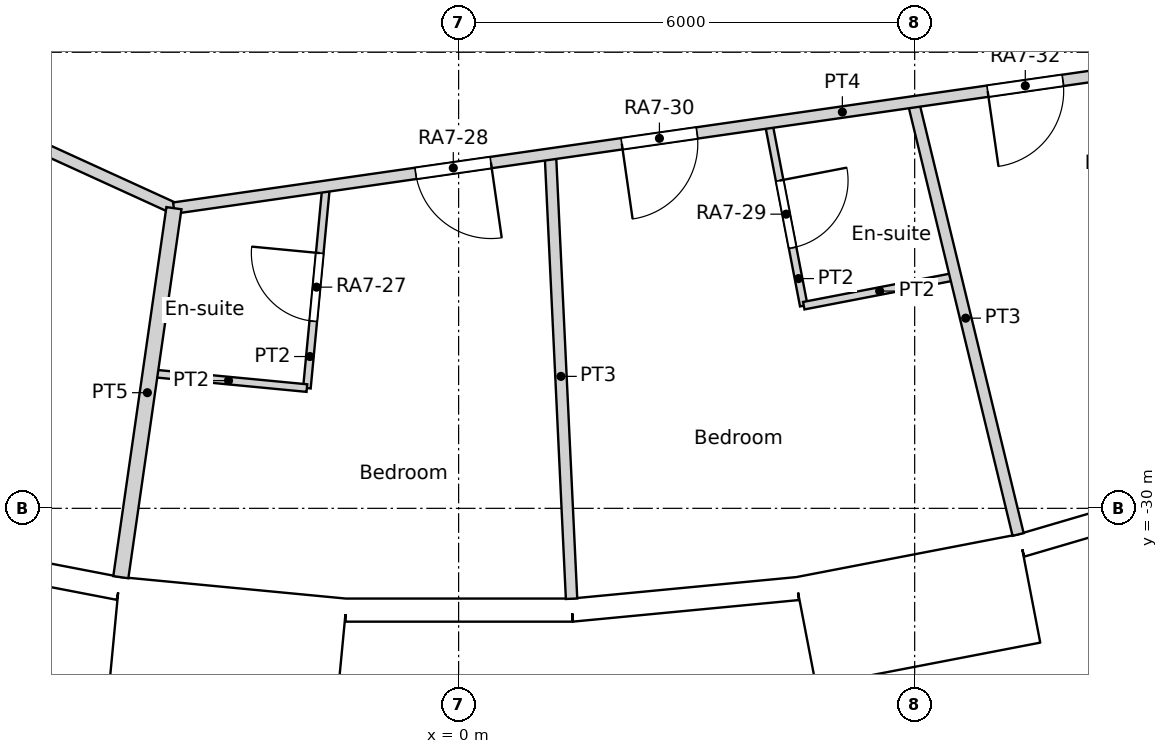
"""IFC4 building model, lengths in metres.
Left out: names, types, materials, properties, quantities, classifications, styles, units other than length and angle.
Written with IfcOpenShell. Run it as: python <this file> out.ifc"""

import sys

from ifc_helpers import new_model, si_unit, direction, frame, frame_2d, origin, origin_2d, place, context, subcontext, project, spatial, rectangle, circle, extrude, element, fill, save


model = new_model("IFC4")
c1 = context("Model", 3, precision=1e-05, world=origin(), true_north=direction((0.0, 1.0)))
c2 = subcontext(c1, "Body", "Model", "MODEL_VIEW")
j1 = project(units=[si_unit("LENGTHUNIT", "METRE"), si_unit("PLANEANGLEUNIT", "RADIAN")], contexts=[c1])
p1 = place(None, origin())
s1 = spatial("IfcSite", under=j1, at=p1, CompositionType="ELEMENT")
p2 = place(p1, origin())
s2 = spatial("IfcBuilding", under=s1, at=p2, CompositionType="ELEMENT")
p3 = place(p2, frame((0.0, 0.0, 93.0)))
s3 = spatial("IfcBuildingStorey", under=s2, at=p3, CompositionType="ELEMENT", Elevation=93.0)
for number, where, z_axis, x_axis in (
    (1, (-4.309, -29.966, 0.0), (0.0, 0.0, 1.0), (1.0, 0.0, 0.0)),
    (2, (1.44, -30.24, 0.0), (0.0, 0.0, 1.0), (1.0, 0.0, 0.0)),
    (3, (7.137, -29.421, 0.0), (0.0, 0.0, 1.0), (1.0, 0.0, 0.0)),
):
    element("IfcColumn", number, at=place(p3, frame(where, z_axis=z_axis, x_axis=x_axis)), inside=s3, PredefinedType="COLUMN", context=c2, shape_type="SweptSolid", body=[
        extrude(circle(Radius=0.6, at=origin_2d()), origin(), (0.0, 0.0, 1.0), 3.6),
    ])
for number, where, z_axis, x_axis in (
    (4, (-1.427, -24.506, 0.0), (0.0, 0.0, 1.0), (1.0, 0.0, 0.0)),
    (5, (4.263, -24.175, 0.0), (0.0, 0.0, 1.0), (1.0, 0.0, 0.0)),
):
    element("IfcColumn", number, at=place(p3, frame(where, z_axis=z_axis, x_axis=x_axis)), inside=s3, PredefinedType="COLUMN", context=c2, shape_type="SweptSolid", body=[
        extrude(circle(Radius=0.65, at=origin_2d()), origin(), (0.0, 0.0, 1.0), 3.6),
    ])
p4 = place(p3, frame((-7.397, -30.49, 0.0), z_axis=(0.0, 0.0, 1.0), x_axis=(0.981924535406, -0.189272836848, 0.0)))
e6 = element("IfcWall", 6, at=p4, inside=s3, PredefinedType="SOLIDWALL", context=c2, shape_type="SweptSolid", body=[
    extrude(rectangle(XDim=2.98, YDim=0.3, at=frame_2d((1.49, 0.0))), origin(), (0.0, 0.0, 1.0), 3.15),
])
p5 = place(p4, frame((1.49, 0.0, 1.55)))
e7 = element("IfcOpeningElement", 7, at=p5, cuts=e6, PredefinedType="OPENING", context=c2, shape_type="SweptSolid", body=[
    extrude(circle(Radius=0.9, at=origin_2d()), frame((0.0, 0.16, 0.0), z_axis=(0.0, -1.0, 0.0), x_axis=(1.0, 0.0, 0.0)), (0.0, 0.0, 1.0), 0.32),
])
p6 = place(p3, frame((-4.527, -31.627, -0.45), z_axis=(0.0, 0.0, 1.0), x_axis=(0.995472768558, -0.09504718333, 0.0)))
e8 = element("IfcWall", 8, at=p6, inside=s3, PredefinedType="ELEMENTEDWALL", context=c2, shape_type="SweptSolid", body=[
    extrude(rectangle(XDim=3.0, YDim=1.45, at=frame_2d((1.5, 0.0))), origin(), (0.0, 0.0, 1.0), 3.6),
])
p7 = place(p6, frame((1.5, 0.0, 2.0)))
e9 = element("IfcOpeningElement", 9, at=p7, cuts=e8, PredefinedType="OPENING", context=c2, shape_type="SweptSolid", body=[
    extrude(circle(Radius=0.9, at=origin_2d()), frame((0.0, 0.735, 0.0), z_axis=(0.0, -1.0, 0.0), x_axis=(1.0, 0.0, 0.0)), (0.0, 0.0, 1.0), 1.47),
])
p8 = place(p3, frame((-1.487, -31.339, 0.0), z_axis=(0.0, 0.0, 1.0), x_axis=(1.0, 0.0, 0.0)))
e10 = element("IfcWall", 10, at=p8, inside=s3, PredefinedType="SOLIDWALL", context=c2, shape_type="SweptSolid", body=[
    extrude(rectangle(XDim=2.98, YDim=0.3, at=frame_2d((1.49, 0.0))), origin(), (0.0, 0.0, 1.0), 3.15),
])
p9 = place(p8, frame((1.49, 0.0, 1.55)))
e11 = element("IfcOpeningElement", 11, at=p9, cuts=e10, PredefinedType="OPENING", context=c2, shape_type="SweptSolid", body=[
    extrude(circle(Radius=0.9, at=origin_2d()), frame((0.0, 0.16, 0.0), z_axis=(0.0, -1.0, 0.0), x_axis=(1.0, 0.0, 0.0)), (0.0, 0.0, 1.0), 0.32),
])
p10 = place(p3, frame((1.493, -31.339, 0.0), z_axis=(0.0, 0.0, 1.0), x_axis=(0.995472611385, 0.095048829468, 0.0)))
e12 = element("IfcWall", 12, at=p10, inside=s3, PredefinedType="SOLIDWALL", context=c2, shape_type="SweptSolid", body=[
    extrude(rectangle(XDim=2.979, YDim=0.3, at=frame_2d((1.49, 0.0))), origin(), (0.0, 0.0, 1.0), 3.15),
])
p11 = place(p10, frame((1.49, 0.0, 1.55)))
e13 = element("IfcOpeningElement", 13, at=p11, cuts=e12, PredefinedType="OPENING", context=c2, shape_type="SweptSolid", body=[
    extrude(circle(Radius=0.9, at=origin_2d()), frame((0.0, 0.16, 0.0), z_axis=(0.0, -1.0, 0.0), x_axis=(1.0, 0.0, 0.0)), (0.0, 0.0, 1.0), 0.32),
])
p12 = place(p3, frame((4.567, -31.621, -0.45), z_axis=(0.0, 0.0, 1.0), x_axis=(0.981921602273, 0.189288052949, 0.0)))
e14 = element("IfcWall", 14, at=p12, inside=s3, PredefinedType="ELEMENTEDWALL", context=c2, shape_type="SweptSolid", body=[
    extrude(rectangle(XDim=3.0, YDim=1.45, at=frame_2d((1.5, 0.0))), origin(), (0.0, 0.0, 1.0), 3.6),
])
p13 = place(p12, frame((1.5, 0.0, 2.0)))
e15 = element("IfcOpeningElement", 15, at=p13, cuts=e14, PredefinedType="OPENING", context=c2, shape_type="SweptSolid", body=[
    extrude(circle(Radius=0.9, at=origin_2d()), frame((0.0, 0.735, 0.0), z_axis=(0.0, -1.0, 0.0), x_axis=(1.0, 0.0, 0.0)), (0.0, 0.0, 1.0), 1.47),
])
p14 = place(p3, frame((7.403, -30.488, 0.0), z_axis=(0.0, 0.0, 1.0), x_axis=(0.959501085144, 0.281704930036, 0.0)))
e16 = element("IfcWall", 16, at=p14, inside=s3, PredefinedType="SOLIDWALL", context=c2, shape_type="SweptSolid", body=[
    extrude(rectangle(XDim=2.979, YDim=0.3, at=frame_2d((1.49, 0.0))), origin(), (0.0, 0.0, 1.0), 3.15),
])
p15 = place(p14, frame((1.49, 0.0, 1.55)))
e17 = element("IfcOpeningElement", 17, at=p15, cuts=e16, PredefinedType="OPENING", context=c2, shape_type="SweptSolid", body=[
    extrude(circle(Radius=0.9, at=origin_2d()), frame((0.0, 0.16, 0.0), z_axis=(0.0, -1.0, 0.0), x_axis=(1.0, 0.0, 0.0)), (0.0, 0.0, 1.0), 0.32),
])
p16 = place(p3, frame((-17.235, -19.89, 0.0), z_axis=(0.0, 0.0, 1.0), x_axis=(0.90960889055, -0.415465601743, 0.0)))
e18 = element("IfcWall", 18, at=p16, inside=s3, PredefinedType="PARTITIONING", context=c2, shape_type="SweptSolid", body=[
    extrude(rectangle(XDim=14.829, YDim=0.15, at=frame_2d((7.415, 0.0))), origin(), (0.0, 0.0, 1.0), 3.15),
])
p17 = place(p16, frame((6.939, 0.0, 0.0)))
e19 = element("IfcOpeningElement", 19, at=p17, cuts=e18, PredefinedType="OPENING", context=c2, shape_type="SweptSolid", body=[
    extrude(rectangle(XDim=0.95, YDim=2.1, at=frame_2d((0.475, 1.05))), frame((0.0, 0.075, 0.0), z_axis=(0.0, -1.0, 0.0), x_axis=(1.0, 0.0, 0.0)), (0.0, 0.0, 1.0), 0.15),
])
p18 = place(p3, frame((-3.746, -26.05, 0.0), z_axis=(0.0, 0.0, 1.0), x_axis=(0.98983491963, 0.142221066938, 0.0)))
e20 = element("IfcWall", 20, at=p18, inside=s3, PredefinedType="PARTITIONING", context=c2, shape_type="SweptSolid", body=[
    extrude(rectangle(XDim=14.83, YDim=0.15, at=frame_2d((7.415, 0.0))), origin(), (0.0, 0.0, 1.0), 3.15),
])
p19 = place(p18, frame((3.214, 0.0, 0.0)))
e21 = element("IfcOpeningElement", 21, at=p19, cuts=e20, PredefinedType="OPENING", context=c2, shape_type="SweptSolid", body=[
    extrude(rectangle(XDim=1.0, YDim=2.1, at=frame_2d((0.5, 1.05))), frame((0.0, 0.075, 0.0), z_axis=(0.0, -1.0, 0.0), x_axis=(1.0, 0.0, 0.0)), (0.0, 0.0, 1.0), 0.15),
])
p20 = place(p18, frame((5.954, 0.0, 0.0)))
e22 = element("IfcOpeningElement", 22, at=p20, cuts=e20, PredefinedType="OPENING", context=c2, shape_type="SweptSolid", body=[
    extrude(rectangle(XDim=1.0, YDim=2.1, at=frame_2d((0.5, 1.05))), frame((0.0, 0.075, 0.0), z_axis=(0.0, -1.0, 0.0), x_axis=(1.0, 0.0, 0.0)), (0.0, 0.0, 1.0), 0.15),
])
p21 = place(p18, frame((10.816, 0.0, 0.0)))
e23 = element("IfcOpeningElement", 23, at=p21, cuts=e20, PredefinedType="OPENING", context=c2, shape_type="SweptSolid", body=[
    extrude(rectangle(XDim=1.0, YDim=2.1, at=frame_2d((0.5, 1.05))), frame((0.0, 0.075, 0.0), z_axis=(0.0, -1.0, 0.0), x_axis=(1.0, 0.0, 0.0)), (0.0, 0.0, 1.0), 0.15),
])
p22 = place(p3, frame((-4.444, -30.906, 0.0), z_axis=(0.0, 0.0, 1.0), x_axis=(0.142452592463, 0.989801626035, 0.0)))
e24 = element("IfcWall", 24, at=p22, inside=s3, PredefinedType="PARTITIONING", context=c2, shape_type="SweptSolid", body=[
    extrude(rectangle(XDim=4.905, YDim=0.2, at=frame_2d((2.453, 0.0))), origin(), (0.0, 0.0, 1.0), 3.15),
])
p23 = place(p3, frame((-4.058, -28.221, 0.0), z_axis=(0.0, 0.0, 1.0), x_axis=(0.995466291052, -0.095115000814, 0.0)))
e25 = element("IfcWall", 25, at=p23, inside=s3, PredefinedType="PARTITIONING", context=c2, shape_type="SweptSolid", body=[
    extrude(rectangle(XDim=2.071, YDim=0.1, at=frame_2d((1.036, 0.0))), origin(), (0.0, 0.0, 1.0), 3.15),
])
p24 = place(p3, frame((-1.996, -28.418, 0.0), z_axis=(0.0, 0.0, 1.0), x_axis=(0.094925726797, 0.995484357683, 0.0)))
e26 = element("IfcWall", 26, at=p24, inside=s3, PredefinedType="PARTITIONING", context=c2, shape_type="SweptSolid", body=[
    extrude(rectangle(XDim=2.667, YDim=0.1, at=frame_2d((1.333, 0.0))), origin(), (0.0, 0.0, 1.0), 3.15),
])
p25 = place(p24, frame((0.884, 0.0, 0.0)))
e27 = element("IfcOpeningElement", 27, at=p25, cuts=e26, PredefinedType="OPENING", context=c2, shape_type="SweptSolid", body=[
    extrude(rectangle(XDim=0.9, YDim=2.04, at=frame_2d((0.45, 1.02))), frame((0.0, 0.05, 0.0), z_axis=(0.0, -1.0, 0.0), x_axis=(1.0, 0.0, 0.0)), (0.0, 0.0, 1.0), 0.1),
])
p26 = place(p3, frame((1.207, -25.339, 0.0), z_axis=(0.0, 0.0, 1.0), x_axis=(0.047648334785, -0.998864173045, 0.0)))
e28 = element("IfcWall", 28, at=p26, inside=s3, PredefinedType="PARTITIONING", context=c2, shape_type="SweptSolid", body=[
    extrude(rectangle(XDim=5.856, YDim=0.15, at=frame_2d((2.928, 0.0))), origin(), (0.0, 0.0, 1.0), 3.15),
])
p27 = place(p3, frame((4.077, -24.926, 0.0), z_axis=(0.0, 0.0, 1.0), x_axis=(0.18925724964, -0.981927539821, 0.0)))
e29 = element("IfcWall", 29, at=p27, inside=s3, PredefinedType="PARTITIONING", context=c2, shape_type="SweptSolid", body=[
    extrude(rectangle(XDim=2.452, YDim=0.1, at=frame_2d((1.226, 0.0))), origin(), (0.0, 0.0, 1.0), 3.15),
])
p28 = place(p27, frame((0.776, 0.0, 0.0)))
e30 = element("IfcOpeningElement", 30, at=p28, cuts=e29, PredefinedType="OPENING", context=c2, shape_type="SweptSolid", body=[
    extrude(rectangle(XDim=0.9, YDim=2.04, at=frame_2d((0.45, 1.02))), frame((0.0, 0.05, 0.0), z_axis=(0.0, -1.0, 0.0), x_axis=(1.0, 0.0, 0.0)), (0.0, 0.0, 1.0), 0.1),
])
p29 = place(p3, frame((4.541, -27.334, 0.0), z_axis=(0.0, 0.0, 1.0), x_axis=(0.981919009751, 0.189301501024, 0.0)))
e31 = element("IfcWall", 31, at=p29, inside=s3, PredefinedType="PARTITIONING", context=c2, shape_type="SweptSolid", body=[
    extrude(rectangle(XDim=2.034, YDim=0.1, at=frame_2d((1.017, 0.0))), origin(), (0.0, 0.0, 1.0), 3.15),
])
p30 = place(p3, frame((5.981, -24.652, 0.0), z_axis=(0.0, 0.0, 1.0), x_axis=(0.235604797906, -0.971848948759, 0.0)))
e32 = element("IfcWall", 32, at=p30, inside=s3, PredefinedType="PARTITIONING", context=c2, shape_type="SweptSolid", body=[
    extrude(rectangle(XDim=5.857, YDim=0.15, at=frame_2d((2.928, 0.0))), origin(), (0.0, 0.0, 1.0), 3.15),
])
p31 = place(p5, origin())
e33 = element("IfcWindow", 33, at=p31, inside=s3, PartitioningType="SINGLE_PANEL", PredefinedType="WINDOW", context=c2, shape_type="SweptSolid", body=[
    extrude(circle(Radius=0.9, at=origin_2d()), frame((0.0, 0.12, 0.0), z_axis=(0.0, -1.0, 0.0), x_axis=(1.0, 0.0, 0.0)), (0.0, 0.0, 1.0), 0.1),
])
fill(e7, e33)
p32 = place(p7, origin())
e34 = element("IfcWindow", 34, at=p32, inside=s3, PartitioningType="SINGLE_PANEL", PredefinedType="WINDOW", context=c2, shape_type="SweptSolid", body=[
    extrude(circle(Radius=0.9, at=origin_2d()), frame((0.0, 0.695, 0.0), z_axis=(0.0, -1.0, 0.0), x_axis=(1.0, 0.0, 0.0)), (0.0, 0.0, 1.0), 0.1),
])
fill(e9, e34)
p33 = place(p9, origin())
e35 = element("IfcWindow", 35, at=p33, inside=s3, PartitioningType="SINGLE_PANEL", PredefinedType="WINDOW", context=c2, shape_type="SweptSolid", body=[
    extrude(circle(Radius=0.9, at=origin_2d()), frame((0.0, 0.12, 0.0), z_axis=(0.0, -1.0, 0.0), x_axis=(1.0, 0.0, 0.0)), (0.0, 0.0, 1.0), 0.1),
])
fill(e11, e35)
p34 = place(p11, origin())
e36 = element("IfcWindow", 36, at=p34, inside=s3, PartitioningType="SINGLE_PANEL", PredefinedType="WINDOW", context=c2, shape_type="SweptSolid", body=[
    extrude(circle(Radius=0.9, at=origin_2d()), frame((0.0, 0.12, 0.0), z_axis=(0.0, -1.0, 0.0), x_axis=(1.0, 0.0, 0.0)), (0.0, 0.0, 1.0), 0.1),
])
fill(e13, e36)
p35 = place(p13, origin())
e37 = element("IfcWindow", 37, at=p35, inside=s3, PartitioningType="SINGLE_PANEL", PredefinedType="WINDOW", context=c2, shape_type="SweptSolid", body=[
    extrude(circle(Radius=0.9, at=origin_2d()), frame((0.0, 0.695, 0.0), z_axis=(0.0, -1.0, 0.0), x_axis=(1.0, 0.0, 0.0)), (0.0, 0.0, 1.0), 0.1),
])
fill(e15, e37)
p36 = place(p15, origin())
e38 = element("IfcWindow", 38, at=p36, inside=s3, PartitioningType="SINGLE_PANEL", PredefinedType="WINDOW", context=c2, shape_type="SweptSolid", body=[
    extrude(circle(Radius=0.9, at=origin_2d()), frame((0.0, 0.12, 0.0), z_axis=(0.0, -1.0, 0.0), x_axis=(1.0, 0.0, 0.0)), (0.0, 0.0, 1.0), 0.1),
])
fill(e17, e38)
p37 = place(p25, origin())
e39 = element("IfcDoor", 39, at=p37, inside=s3, OperationType="SINGLE_SWING_RIGHT", PredefinedType="DOOR", context=c2, shape_type="SweptSolid", body=[
    extrude(rectangle(XDim=0.9, YDim=2.04, at=frame_2d((0.45, 1.02))), frame((0.0, 0.025, 0.0), z_axis=(0.0, -1.0, 0.0), x_axis=(1.0, 0.0, 0.0)), (0.0, 0.0, 1.0), 0.05),
])
fill(e27, e39)
p38 = place(p19, origin())
e40 = element("IfcDoor", 40, at=p38, inside=s3, OperationType="SINGLE_SWING_LEFT", PredefinedType="DOOR", context=c2, shape_type="SweptSolid", body=[
    extrude(rectangle(XDim=1.0, YDim=2.1, at=frame_2d((0.5, 1.05))), frame((0.0, 0.025, 0.0), z_axis=(0.0, -1.0, 0.0), x_axis=(1.0, 0.0, 0.0)), (0.0, 0.0, 1.0), 0.05),
])
fill(e21, e40)
p39 = place(p28, origin())
e41 = element("IfcDoor", 41, at=p39, inside=s3, OperationType="SINGLE_SWING_LEFT", PredefinedType="DOOR", context=c2, shape_type="SweptSolid", body=[
    extrude(rectangle(XDim=0.9, YDim=2.04, at=frame_2d((0.45, 1.02))), frame((0.0, 0.025, 0.0), z_axis=(0.0, -1.0, 0.0), x_axis=(1.0, 0.0, 0.0)), (0.0, 0.0, 1.0), 0.05),
])
fill(e30, e41)
p40 = place(p20, origin())
e42 = element("IfcDoor", 42, at=p40, inside=s3, OperationType="SINGLE_SWING_RIGHT", PredefinedType="DOOR", context=c2, shape_type="SweptSolid", body=[
    extrude(rectangle(XDim=1.0, YDim=2.1, at=frame_2d((0.5, 1.05))), frame((0.0, 0.025, 0.0), z_axis=(0.0, -1.0, 0.0), x_axis=(1.0, 0.0, 0.0)), (0.0, 0.0, 1.0), 0.05),
])
fill(e22, e42)
p41 = place(p21, origin())
e43 = element("IfcDoor", 43, at=p41, inside=s3, OperationType="SINGLE_SWING_RIGHT", PredefinedType="DOOR", context=c2, shape_type="SweptSolid", body=[
    extrude(rectangle(XDim=1.0, YDim=2.1, at=frame_2d((0.5, 1.05))), frame((0.0, 0.025, 0.0), z_axis=(0.0, -1.0, 0.0), x_axis=(1.0, 0.0, 0.0)), (0.0, 0.0, 1.0), 0.05),
])
fill(e23, e43)
save(model, sys.argv[1])
